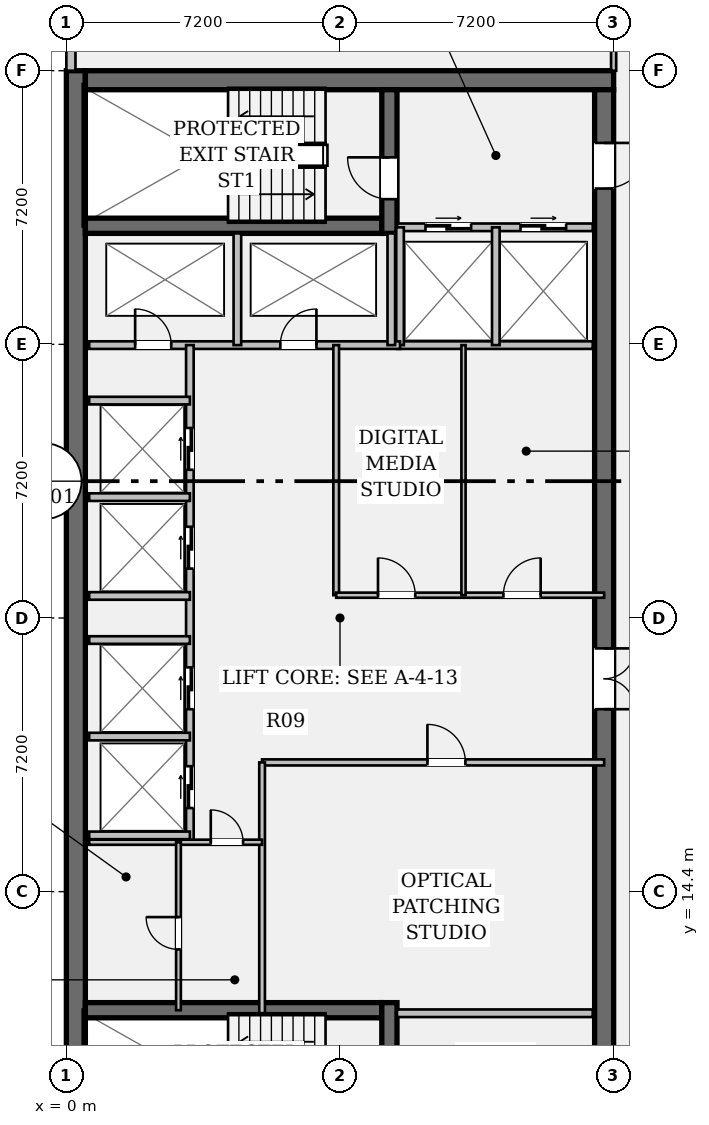
"""IFC4 building model, lengths in metres.
Left out: names, types, materials, properties, quantities, classifications, styles, units other than length and angle.
Written with IfcOpenShell. Run it as: python <this file> out.ifc"""

import sys

from ifc_helpers import new_model, si_unit, direction, frame, frame_2d, origin, place, context, subcontext, project, spatial, rectangle, extrude, element, fill, save


model = new_model("IFC4")
c1 = context("Model", 3, precision=1e-05, world=origin(), true_north=direction((0.0, 1.0)))
c2 = subcontext(c1, "Body", "Model", "MODEL_VIEW")
j1 = project(units=[si_unit("LENGTHUNIT", "METRE"), si_unit("PLANEANGLEUNIT", "RADIAN")], contexts=[c1])
p1 = place(None, origin())
s1 = spatial("IfcSite", under=j1, at=p1, CompositionType="ELEMENT")
p2 = place(p1, origin())
s2 = spatial("IfcBuilding", under=s1, at=p2, CompositionType="ELEMENT")
p3 = place(p2, frame((0.0, 0.0, 276.15)))
s3 = spatial("IfcBuildingStorey", under=s2, at=p3, CompositionType="ELEMENT", Elevation=276.15)
p4 = place(p3, frame((0.25, 7.2, 0.0), z_axis=(0.0, 0.0, 1.0), x_axis=(0.0, 1.0, 0.0)))
e1 = element("IfcWall", 1, at=p4, inside=s3, PredefinedType="SHEAR", context=c2, shape_type="SweptSolid", body=[
    extrude(rectangle(XDim=28.8, YDim=0.5, at=frame_2d((14.4, 0.0))), origin(), (0.0, 0.0, 1.0), 3.24),
])
p5 = place(p3, frame((0.5, 35.75, 0.0), z_axis=(0.0, 0.0, 1.0), x_axis=(1.0, 0.0, 0.0)))
e2 = element("IfcWall", 2, at=p5, inside=s3, PredefinedType="SHEAR", context=c2, shape_type="SweptSolid", body=[
    extrude(rectangle(XDim=13.9, YDim=0.5, at=frame_2d((6.95, 0.0))), origin(), (0.0, 0.0, 1.0), 3.24),
])
p6 = place(p3, frame((14.15, 35.5, 0.0), z_axis=(0.0, 0.0, 1.0), x_axis=(0.0, -1.0, 0.0)))
e3 = element("IfcWall", 3, at=p6, inside=s3, PredefinedType="SHEAR", context=c2, shape_type="SweptSolid", body=[
    extrude(rectangle(XDim=27.8, YDim=0.5, at=frame_2d((13.9, 0.0))), origin(), (0.0, 0.0, 1.0), 3.24),
])
p7 = place(p6, frame((1.4, 0.0, 0.0)))
e4 = element("IfcOpeningElement", 4, at=p7, cuts=e3, PredefinedType="OPENING", context=c2, shape_type="SweptSolid", body=[
    extrude(rectangle(XDim=1.2, YDim=2.15, at=frame_2d((0.6, 1.075))), frame((0.0, 0.262, 0.0), z_axis=(0.0, -1.0, 0.0), x_axis=(1.0, 0.0, 0.0)), (0.0, 0.0, 1.0), 0.524),
])
p8 = place(p6, frame((25.35, 0.0, 0.0)))
e5 = element("IfcOpeningElement", 5, at=p8, cuts=e3, PredefinedType="OPENING", context=c2, shape_type="SweptSolid", body=[
    extrude(rectangle(XDim=1.2, YDim=2.15, at=frame_2d((0.6, 1.075))), frame((0.0, 0.262, 0.0), z_axis=(0.0, -1.0, 0.0), x_axis=(1.0, 0.0, 0.0)), (0.0, 0.0, 1.0), 0.524),
])
p9 = place(p6, frame((14.7, 0.0, 0.0)))
e6 = element("IfcOpeningElement", 6, at=p9, cuts=e3, PredefinedType="OPENING", context=c2, shape_type="SweptSolid", body=[
    extrude(rectangle(XDim=1.6, YDim=2.2, at=frame_2d((0.8, 1.1))), frame((0.0, 0.262, 0.0), z_axis=(0.0, -1.0, 0.0), x_axis=(1.0, 0.0, 0.0)), (0.0, 0.0, 1.0), 0.524),
])
for number, where, z_axis, x_axis in (
    (7, (0.5, 31.92, 0.0), (0.0, 0.0, 1.0), (1.0, 0.0, 0.0)),
    (8, (0.5, 11.28, 0.0), (0.0, 0.0, 1.0), (1.0, 0.0, 0.0)),
):
    element("IfcWall", number, at=place(p3, frame(where, z_axis=z_axis, x_axis=x_axis)), inside=s3, PredefinedType="SHEAR", context=c2, shape_type="SweptSolid", body=[
        extrude(rectangle(XDim=7.8, YDim=0.4, at=frame_2d((3.9, 0.0))), origin(), (0.0, 0.0, 1.0), 3.24),
    ])
p10 = place(p3, frame((8.5, 31.72, 0.0), z_axis=(0.0, 0.0, 1.0), x_axis=(0.0, 1.0, 0.0)))
e9 = element("IfcWall", 9, at=p10, inside=s3, PredefinedType="SHEAR", context=c2, shape_type="SweptSolid", body=[
    extrude(rectangle(XDim=3.78, YDim=0.4, at=frame_2d((1.89, 0.0))), origin(), (0.0, 0.0, 1.0), 3.24),
])
p11 = place(p10, frame((0.9, 0.0, 0.0)))
e10 = element("IfcOpeningElement", 10, at=p11, cuts=e9, PredefinedType="OPENING", context=c2, shape_type="SweptSolid", body=[
    extrude(rectangle(XDim=1.1, YDim=2.15, at=frame_2d((0.55, 1.075))), frame((0.0, 0.212, 0.0), z_axis=(0.0, -1.0, 0.0), x_axis=(1.0, 0.0, 0.0)), (0.0, 0.0, 1.0), 0.424),
])
p12 = place(p3, frame((8.5, 7.7, 0.0), z_axis=(0.0, 0.0, 1.0), x_axis=(0.0, 1.0, 0.0)))
e11 = element("IfcWall", 11, at=p12, inside=s3, PredefinedType="SHEAR", context=c2, shape_type="SweptSolid", body=[
    extrude(rectangle(XDim=3.78, YDim=0.4, at=frame_2d((1.89, 0.0))), origin(), (0.0, 0.0, 1.0), 3.24),
])
p13 = place(p12, frame((0.85, 0.0, 0.0)))
e12 = element("IfcOpeningElement", 12, at=p13, cuts=e11, PredefinedType="OPENING", context=c2, shape_type="SweptSolid", body=[
    extrude(rectangle(XDim=1.1, YDim=2.15, at=frame_2d((0.55, 1.075))), frame((0.0, 0.212, 0.0), z_axis=(0.0, -1.0, 0.0), x_axis=(1.0, 0.0, 0.0)), (0.0, 0.0, 1.0), 0.424),
])
p14 = place(p3, frame((0.12, 36.0, 0.0), z_axis=(0.0, 0.0, 1.0), x_axis=(0.0, 1.0, 0.0)))
e13 = element("IfcWall", 13, at=p14, inside=s3, PredefinedType="STANDARD", context=c2, shape_type="SweptSolid", body=[
    extrude(rectangle(XDim=1.25, YDim=0.24, at=frame_2d((0.625, 0.0))), origin(), (0.0, 0.0, 1.0), 3.24),
])
p15 = place(p3, frame((8.7, 31.88, 0.0), z_axis=(0.0, 0.0, 1.0), x_axis=(1.0, 0.0, 0.0)))
e14 = element("IfcWall", 14, at=p15, inside=s3, PredefinedType="PARTITIONING", context=c2, shape_type="SweptSolid", body=[
    extrude(rectangle(XDim=5.15, YDim=0.2, at=frame_2d((2.575, 0.0))), origin(), (0.0, 0.0, 1.0), 3.24),
])
p16 = place(p15, frame((0.75, 0.0, 0.0)))
e15 = element("IfcOpeningElement", 15, at=p16, cuts=e14, PredefinedType="OPENING", context=c2, shape_type="SweptSolid", body=[
    extrude(rectangle(XDim=1.2, YDim=2.2, at=frame_2d((0.6, 1.1))), frame((0.0, 0.112, 0.0), z_axis=(0.0, -1.0, 0.0), x_axis=(1.0, 0.0, 0.0)), (0.0, 0.0, 1.0), 0.224),
])
p17 = place(p15, frame((3.25, 0.0, 0.0)))
e16 = element("IfcOpeningElement", 16, at=p17, cuts=e14, PredefinedType="OPENING", context=c2, shape_type="SweptSolid", body=[
    extrude(rectangle(XDim=1.2, YDim=2.2, at=frame_2d((0.6, 1.1))), frame((0.0, 0.112, 0.0), z_axis=(0.0, -1.0, 0.0), x_axis=(1.0, 0.0, 0.0)), (0.0, 0.0, 1.0), 0.224),
])
for number, where, z_axis, x_axis in (
    (17, (8.7, 11.2, 0.0), (0.0, 0.0, 1.0), (1.0, 0.0, 0.0)),
    (18, (8.7, 28.78, 0.0), (0.0, 0.0, 1.0), (1.0, 0.0, 0.0)),
):
    element("IfcWall", number, at=place(p3, frame(where, z_axis=z_axis, x_axis=x_axis)), inside=s3, PredefinedType="PARTITIONING", context=c2, shape_type="SweptSolid", body=[
        extrude(rectangle(XDim=5.15, YDim=0.2, at=frame_2d((2.575, 0.0))), origin(), (0.0, 0.0, 1.0), 3.24),
    ])
for number, where, z_axis, x_axis in (
    (19, (8.78, 28.78, 0.0), (0.0, 0.0, 1.0), (0.0, 1.0, 0.0)),
    (20, (11.3, 28.78, 0.0), (0.0, 0.0, 1.0), (0.0, 1.0, 0.0)),
):
    element("IfcWall", number, at=place(p3, frame(where, z_axis=z_axis, x_axis=x_axis)), inside=s3, PredefinedType="PARTITIONING", context=c2, shape_type="SweptSolid", body=[
        extrude(rectangle(XDim=3.1, YDim=0.2, at=frame_2d((1.55, 0.0))), origin(), (0.0, 0.0, 1.0), 3.24),
    ])
p18 = place(p3, frame((0.6, 28.78, 0.0), z_axis=(0.0, 0.0, 1.0), x_axis=(1.0, 0.0, 0.0)))
e21 = element("IfcWall", 21, at=p18, inside=s3, PredefinedType="PARTITIONING", context=c2, shape_type="SweptSolid", body=[
    extrude(rectangle(XDim=8.18, YDim=0.2, at=frame_2d((4.09, 0.0))), origin(), (0.0, 0.0, 1.0), 3.24),
])
p19 = place(p18, frame((1.21, 0.0, 0.0)))
e22 = element("IfcOpeningElement", 22, at=p19, cuts=e21, PredefinedType="OPENING", context=c2, shape_type="SweptSolid", body=[
    extrude(rectangle(XDim=0.95, YDim=2.15, at=frame_2d((0.475, 1.075))), frame((0.0, 0.112, 0.0), z_axis=(0.0, -1.0, 0.0), x_axis=(1.0, 0.0, 0.0)), (0.0, 0.0, 1.0), 0.224),
])
p20 = place(p18, frame((5.03, 0.0, 0.0)))
e23 = element("IfcOpeningElement", 23, at=p20, cuts=e21, PredefinedType="OPENING", context=c2, shape_type="SweptSolid", body=[
    extrude(rectangle(XDim=0.95, YDim=2.15, at=frame_2d((0.475, 1.075))), frame((0.0, 0.112, 0.0), z_axis=(0.0, -1.0, 0.0), x_axis=(1.0, 0.0, 0.0)), (0.0, 0.0, 1.0), 0.224),
])
for number, where, z_axis, x_axis in (
    (24, (4.5, 28.78, 0.0), (0.0, 0.0, 1.0), (0.0, 1.0, 0.0)),
    (25, (8.55, 28.78, 0.0), (0.0, 0.0, 1.0), (0.0, 1.0, 0.0)),
):
    element("IfcWall", number, at=place(p3, frame(where, z_axis=z_axis, x_axis=x_axis)), inside=s3, PredefinedType="PARTITIONING", context=c2, shape_type="SweptSolid", body=[
        extrude(rectangle(XDim=2.94, YDim=0.2, at=frame_2d((1.47, 0.0))), origin(), (0.0, 0.0, 1.0), 3.24),
    ])
p21 = place(p3, frame((3.25, 15.7, 0.0), z_axis=(0.0, 0.0, 1.0), x_axis=(0.0, 1.0, 0.0)))
e26 = element("IfcWall", 26, at=p21, inside=s3, PredefinedType="PARTITIONING", context=c2, shape_type="SweptSolid", body=[
    extrude(rectangle(XDim=13.08, YDim=0.2, at=frame_2d((6.54, 0.0))), origin(), (0.0, 0.0, 1.0), 3.24),
])
p22 = place(p21, frame((0.9, 0.0, 0.0)))
e27 = element("IfcOpeningElement", 27, at=p22, cuts=e26, PredefinedType="OPENING", context=c2, shape_type="SweptSolid", body=[
    extrude(rectangle(XDim=1.1, YDim=2.2, at=frame_2d((0.55, 1.1))), frame((0.0, 0.112, 0.0), z_axis=(0.0, -1.0, 0.0), x_axis=(1.0, 0.0, 0.0)), (0.0, 0.0, 1.0), 0.224),
])
p23 = place(p21, frame((3.5, 0.0, 0.0)))
e28 = element("IfcOpeningElement", 28, at=p23, cuts=e26, PredefinedType="OPENING", context=c2, shape_type="SweptSolid", body=[
    extrude(rectangle(XDim=1.1, YDim=2.2, at=frame_2d((0.55, 1.1))), frame((0.0, 0.112, 0.0), z_axis=(0.0, -1.0, 0.0), x_axis=(1.0, 0.0, 0.0)), (0.0, 0.0, 1.0), 0.224),
])
p24 = place(p21, frame((7.2, 0.0, 0.0)))
e29 = element("IfcOpeningElement", 29, at=p24, cuts=e26, PredefinedType="OPENING", context=c2, shape_type="SweptSolid", body=[
    extrude(rectangle(XDim=1.1, YDim=2.2, at=frame_2d((0.55, 1.1))), frame((0.0, 0.112, 0.0), z_axis=(0.0, -1.0, 0.0), x_axis=(1.0, 0.0, 0.0)), (0.0, 0.0, 1.0), 0.224),
])
p25 = place(p21, frame((9.8, 0.0, 0.0)))
e30 = element("IfcOpeningElement", 30, at=p25, cuts=e26, PredefinedType="OPENING", context=c2, shape_type="SweptSolid", body=[
    extrude(rectangle(XDim=1.1, YDim=2.2, at=frame_2d((0.55, 1.1))), frame((0.0, 0.112, 0.0), z_axis=(0.0, -1.0, 0.0), x_axis=(1.0, 0.0, 0.0)), (0.0, 0.0, 1.0), 0.224),
])
for number, where, z_axis, x_axis in (
    (31, (0.6, 15.88, 0.0), (0.0, 0.0, 1.0), (1.0, 0.0, 0.0)),
    (32, (0.6, 18.48, 0.0), (0.0, 0.0, 1.0), (1.0, 0.0, 0.0)),
    (33, (0.6, 22.18, 0.0), (0.0, 0.0, 1.0), (1.0, 0.0, 0.0)),
    (34, (0.6, 24.78, 0.0), (0.0, 0.0, 1.0), (1.0, 0.0, 0.0)),
    (35, (0.6, 21.02, 0.0), (0.0, 0.0, 1.0), (1.0, 0.0, 0.0)),
    (36, (0.6, 27.32, 0.0), (0.0, 0.0, 1.0), (1.0, 0.0, 0.0)),
):
    element("IfcWall", number, at=place(p3, frame(where, z_axis=z_axis, x_axis=x_axis)), inside=s3, PredefinedType="PARTITIONING", context=c2, shape_type="SweptSolid", body=[
        extrude(rectangle(XDim=2.65, YDim=0.2, at=frame_2d((1.325, 0.0))), origin(), (0.0, 0.0, 1.0), 3.24),
    ])
p26 = place(p3, frame((7.1, 22.2, 0.0), z_axis=(0.0, 0.0, 1.0), x_axis=(0.0, 1.0, 0.0)))
e37 = element("IfcWall", 37, at=p26, inside=s3, PredefinedType="PARTITIONING", context=c2, shape_type="SweptSolid", body=[
    extrude(rectangle(XDim=6.58, YDim=0.15, at=frame_2d((3.29, 0.0))), origin(), (0.0, 0.0, 1.0), 3.24),
])
p27 = place(p3, frame((7.1, 22.2, 0.0), z_axis=(0.0, 0.0, 1.0), x_axis=(1.0, 0.0, 0.0)))
e38 = element("IfcWall", 38, at=p27, inside=s3, PredefinedType="PARTITIONING", context=c2, shape_type="SweptSolid", body=[
    extrude(rectangle(XDim=7.05, YDim=0.135, at=frame_2d((3.525, 0.0))), origin(), (0.0, 0.0, 1.0), 3.24),
])
p28 = place(p27, frame((1.1, 0.0, 0.0)))
e39 = element("IfcOpeningElement", 39, at=p28, cuts=e38, PredefinedType="OPENING", context=c2, shape_type="SweptSolid", body=[
    extrude(rectangle(XDim=0.98, YDim=2.15, at=frame_2d((0.49, 1.075))), frame((0.0, 0.08, 0.0), z_axis=(0.0, -1.0, 0.0), x_axis=(1.0, 0.0, 0.0)), (0.0, 0.0, 1.0), 0.159),
])
p29 = place(p27, frame((4.4, 0.0, 0.0)))
e40 = element("IfcOpeningElement", 40, at=p29, cuts=e38, PredefinedType="OPENING", context=c2, shape_type="SweptSolid", body=[
    extrude(rectangle(XDim=0.98, YDim=2.15, at=frame_2d((0.49, 1.075))), frame((0.0, 0.08, 0.0), z_axis=(0.0, -1.0, 0.0), x_axis=(1.0, 0.0, 0.0)), (0.0, 0.0, 1.0), 0.159),
])
p30 = place(p3, frame((10.45, 22.2, 0.0), z_axis=(0.0, 0.0, 1.0), x_axis=(0.0, 1.0, 0.0)))
e41 = element("IfcWall", 41, at=p30, inside=s3, PredefinedType="PARTITIONING", context=c2, shape_type="SweptSolid", body=[
    extrude(rectangle(XDim=6.58, YDim=0.11, at=frame_2d((3.29, 0.0))), origin(), (0.0, 0.0, 1.0), 3.24),
])
p31 = place(p3, frame((5.15, 17.8, 0.0), z_axis=(0.0, 0.0, 1.0), x_axis=(1.0, 0.0, 0.0)))
e42 = element("IfcWall", 42, at=p31, inside=s3, PredefinedType="PARTITIONING", context=c2, shape_type="SweptSolid", body=[
    extrude(rectangle(XDim=9.0, YDim=0.16, at=frame_2d((4.5, 0.0))), origin(), (0.0, 0.0, 1.0), 3.24),
])
p32 = place(p31, frame((4.35, 0.0, 0.0)))
e43 = element("IfcOpeningElement", 43, at=p32, cuts=e42, PredefinedType="OPENING", context=c2, shape_type="SweptSolid", body=[
    extrude(rectangle(XDim=1.0, YDim=2.15, at=frame_2d((0.5, 1.075))), frame((0.0, 0.092, 0.0), z_axis=(0.0, -1.0, 0.0), x_axis=(1.0, 0.0, 0.0)), (0.0, 0.0, 1.0), 0.184),
])
p33 = place(p3, frame((5.15, 11.2, 0.0), z_axis=(0.0, 0.0, 1.0), x_axis=(0.0, 1.0, 0.0)))
e44 = element("IfcWall", 44, at=p33, inside=s3, PredefinedType="PARTITIONING", context=c2, shape_type="SweptSolid", body=[
    extrude(rectangle(XDim=6.6, YDim=0.15, at=frame_2d((3.3, 0.0))), origin(), (0.0, 0.0, 1.0), 3.24),
])
p34 = place(p3, frame((0.6, 15.7, 0.0), z_axis=(0.0, 0.0, 1.0), x_axis=(1.0, 0.0, 0.0)))
e45 = element("IfcWall", 45, at=p34, inside=s3, PredefinedType="PARTITIONING", context=c2, shape_type="SweptSolid", body=[
    extrude(rectangle(XDim=4.55, YDim=0.135, at=frame_2d((2.275, 0.0))), origin(), (0.0, 0.0, 1.0), 3.24),
])
p35 = place(p34, frame((3.2, 0.0, 0.0)))
e46 = element("IfcOpeningElement", 46, at=p35, cuts=e45, PredefinedType="OPENING", context=c2, shape_type="SweptSolid", body=[
    extrude(rectangle(XDim=0.85, YDim=2.15, at=frame_2d((0.425, 1.075))), frame((0.0, 0.08, 0.0), z_axis=(0.0, -1.0, 0.0), x_axis=(1.0, 0.0, 0.0)), (0.0, 0.0, 1.0), 0.159),
])
p36 = place(p3, frame((2.95, 11.28, 0.0), z_axis=(0.0, 0.0, 1.0), x_axis=(0.0, 1.0, 0.0)))
e47 = element("IfcWall", 47, at=p36, inside=s3, PredefinedType="PARTITIONING", context=c2, shape_type="SweptSolid", body=[
    extrude(rectangle(XDim=4.42, YDim=0.125, at=frame_2d((2.21, 0.0))), origin(), (0.0, 0.0, 1.0), 3.24),
])
p37 = place(p36, frame((1.6, 0.0, 0.0)))
e48 = element("IfcOpeningElement", 48, at=p37, cuts=e47, PredefinedType="OPENING", context=c2, shape_type="SweptSolid", body=[
    extrude(rectangle(XDim=0.85, YDim=2.15, at=frame_2d((0.425, 1.075))), frame((0.0, 0.074, 0.0), z_axis=(0.0, -1.0, 0.0), x_axis=(1.0, 0.0, 0.0)), (0.0, 0.0, 1.0), 0.149),
])
p38 = place(p3, frame((14.4, 36.0, 0.0), z_axis=(0.0, 0.0, 1.0), x_axis=(0.0, 1.0, 0.0)))
e49 = element("IfcWall", 49, at=p38, inside=s3, PredefinedType="PARTITIONING", context=c2, shape_type="SweptSolid", body=[
    extrude(rectangle(XDim=3.88, YDim=0.135, at=frame_2d((1.94, 0.0))), origin(), (0.0, 0.0, 1.0), 2.676),
])
p39 = place(p38, frame((0.65, 0.0, 0.0)))
e50 = element("IfcOpeningElement", 50, at=p39, cuts=e49, PredefinedType="OPENING", context=c2, shape_type="SweptSolid", body=[
    extrude(rectangle(XDim=0.9, YDim=2.15, at=frame_2d((0.45, 1.075))), frame((0.0, 0.08, 0.0), z_axis=(0.0, -1.0, 0.0), x_axis=(1.0, 0.0, 0.0)), (0.0, 0.0, 1.0), 0.159),
])
p40 = place(p11, origin())
e51 = element("IfcDoor", 51, at=p40, inside=s3, OperationType="SINGLE_SWING_RIGHT", PredefinedType="DOOR", context=c2, shape_type="SweptSolid", body=[
    extrude(rectangle(XDim=1.1, YDim=2.15, at=frame_2d((0.55, 1.075))), frame((0.0, 0.025, 0.0), z_axis=(0.0, -1.0, 0.0), x_axis=(1.0, 0.0, 0.0)), (0.0, 0.0, 1.0), 0.05),
])
fill(e10, e51)
p41 = place(p7, origin())
e52 = element("IfcDoor", 52, at=p41, inside=s3, OperationType="SINGLE_SWING_LEFT", PredefinedType="DOOR", context=c2, shape_type="SweptSolid", body=[
    extrude(rectangle(XDim=1.2, YDim=2.15, at=frame_2d((0.6, 1.075))), frame((0.0, 0.025, 0.0), z_axis=(0.0, -1.0, 0.0), x_axis=(1.0, 0.0, 0.0)), (0.0, 0.0, 1.0), 0.05),
])
fill(e4, e52)
p42 = place(p16, origin())
e53 = element("IfcDoor", 53, at=p42, inside=s3, OperationType="DOUBLE_DOOR_SLIDING", PredefinedType="DOOR", context=c2, shape_type="SweptSolid", body=[
    extrude(rectangle(XDim=1.2, YDim=2.2, at=frame_2d((0.6, 1.1))), frame((0.0, 0.025, 0.0), z_axis=(0.0, -1.0, 0.0), x_axis=(1.0, 0.0, 0.0)), (0.0, 0.0, 1.0), 0.05),
])
fill(e15, e53)
p43 = place(p17, origin())
e54 = element("IfcDoor", 54, at=p43, inside=s3, OperationType="DOUBLE_DOOR_SLIDING", PredefinedType="DOOR", context=c2, shape_type="SweptSolid", body=[
    extrude(rectangle(XDim=1.2, YDim=2.2, at=frame_2d((0.6, 1.1))), frame((0.0, 0.025, 0.0), z_axis=(0.0, -1.0, 0.0), x_axis=(1.0, 0.0, 0.0)), (0.0, 0.0, 1.0), 0.05),
])
fill(e16, e54)
p44 = place(p19, origin())
e55 = element("IfcDoor", 55, at=p44, inside=s3, OperationType="SINGLE_SWING_LEFT", PredefinedType="DOOR", context=c2, shape_type="SweptSolid", body=[
    extrude(rectangle(XDim=0.95, YDim=2.15, at=frame_2d((0.475, 1.075))), frame((0.0, 0.025, 0.0), z_axis=(0.0, -1.0, 0.0), x_axis=(1.0, 0.0, 0.0)), (0.0, 0.0, 1.0), 0.05),
])
fill(e22, e55)
p45 = place(p20, origin())
e56 = element("IfcDoor", 56, at=p45, inside=s3, OperationType="SINGLE_SWING_RIGHT", PredefinedType="DOOR", context=c2, shape_type="SweptSolid", body=[
    extrude(rectangle(XDim=0.95, YDim=2.15, at=frame_2d((0.475, 1.075))), frame((0.0, 0.025, 0.0), z_axis=(0.0, -1.0, 0.0), x_axis=(1.0, 0.0, 0.0)), (0.0, 0.0, 1.0), 0.05),
])
fill(e23, e56)
p46 = place(p9, origin())
e57 = element("IfcDoor", 57, at=p46, inside=s3, OperationType="DOUBLE_DOOR_SINGLE_SWING", PredefinedType="DOOR", context=c2, shape_type="SweptSolid", body=[
    extrude(rectangle(XDim=1.6, YDim=2.2, at=frame_2d((0.8, 1.1))), frame((0.0, 0.025, 0.0), z_axis=(0.0, -1.0, 0.0), x_axis=(1.0, 0.0, 0.0)), (0.0, 0.0, 1.0), 0.05),
])
fill(e6, e57)
p47 = place(p22, origin())
e58 = element("IfcDoor", 58, at=p47, inside=s3, OperationType="DOUBLE_DOOR_SLIDING", PredefinedType="DOOR", context=c2, shape_type="SweptSolid", body=[
    extrude(rectangle(XDim=1.1, YDim=2.2, at=frame_2d((0.55, 1.1))), frame((0.0, 0.025, 0.0), z_axis=(0.0, -1.0, 0.0), x_axis=(1.0, 0.0, 0.0)), (0.0, 0.0, 1.0), 0.05),
])
fill(e27, e58)
p48 = place(p23, origin())
e59 = element("IfcDoor", 59, at=p48, inside=s3, OperationType="DOUBLE_DOOR_SLIDING", PredefinedType="DOOR", context=c2, shape_type="SweptSolid", body=[
    extrude(rectangle(XDim=1.1, YDim=2.2, at=frame_2d((0.55, 1.1))), frame((0.0, 0.025, 0.0), z_axis=(0.0, -1.0, 0.0), x_axis=(1.0, 0.0, 0.0)), (0.0, 0.0, 1.0), 0.05),
])
fill(e28, e59)
p49 = place(p24, origin())
e60 = element("IfcDoor", 60, at=p49, inside=s3, OperationType="DOUBLE_DOOR_SLIDING", PredefinedType="DOOR", context=c2, shape_type="SweptSolid", body=[
    extrude(rectangle(XDim=1.1, YDim=2.2, at=frame_2d((0.55, 1.1))), frame((0.0, 0.025, 0.0), z_axis=(0.0, -1.0, 0.0), x_axis=(1.0, 0.0, 0.0)), (0.0, 0.0, 1.0), 0.05),
])
fill(e29, e60)
p50 = place(p25, origin())
e61 = element("IfcDoor", 61, at=p50, inside=s3, OperationType="DOUBLE_DOOR_SLIDING", PredefinedType="DOOR", context=c2, shape_type="SweptSolid", body=[
    extrude(rectangle(XDim=1.1, YDim=2.2, at=frame_2d((0.55, 1.1))), frame((0.0, 0.025, 0.0), z_axis=(0.0, -1.0, 0.0), x_axis=(1.0, 0.0, 0.0)), (0.0, 0.0, 1.0), 0.05),
])
fill(e30, e61)
p51 = place(p28, origin())
e62 = element("IfcDoor", 62, at=p51, inside=s3, OperationType="SINGLE_SWING_LEFT", PredefinedType="DOOR", context=c2, shape_type="SweptSolid", body=[
    extrude(rectangle(XDim=0.98, YDim=2.15, at=frame_2d((0.49, 1.075))), frame((0.0, 0.025, 0.0), z_axis=(0.0, -1.0, 0.0), x_axis=(1.0, 0.0, 0.0)), (0.0, 0.0, 1.0), 0.05),
])
fill(e39, e62)
p52 = place(p29, origin())
e63 = element("IfcDoor", 63, at=p52, inside=s3, OperationType="SINGLE_SWING_RIGHT", PredefinedType="DOOR", context=c2, shape_type="SweptSolid", body=[
    extrude(rectangle(XDim=0.98, YDim=2.15, at=frame_2d((0.49, 1.075))), frame((0.0, 0.025, 0.0), z_axis=(0.0, -1.0, 0.0), x_axis=(1.0, 0.0, 0.0)), (0.0, 0.0, 1.0), 0.05),
])
fill(e40, e63)
p53 = place(p32, origin())
e64 = element("IfcDoor", 64, at=p53, inside=s3, OperationType="SINGLE_SWING_LEFT", PredefinedType="DOOR", context=c2, shape_type="SweptSolid", body=[
    extrude(rectangle(XDim=1.0, YDim=2.15, at=frame_2d((0.5, 1.075))), frame((0.0, 0.025, 0.0), z_axis=(0.0, -1.0, 0.0), x_axis=(1.0, 0.0, 0.0)), (0.0, 0.0, 1.0), 0.05),
])
fill(e43, e64)
p54 = place(p35, origin())
e65 = element("IfcDoor", 65, at=p54, inside=s3, OperationType="SINGLE_SWING_LEFT", PredefinedType="DOOR", context=c2, shape_type="SweptSolid", body=[
    extrude(rectangle(XDim=0.85, YDim=2.15, at=frame_2d((0.425, 1.075))), frame((0.0, 0.025, 0.0), z_axis=(0.0, -1.0, 0.0), x_axis=(1.0, 0.0, 0.0)), (0.0, 0.0, 1.0), 0.05),
])
fill(e46, e65)
p55 = place(p37, origin())
e66 = element("IfcDoor", 66, at=p55, inside=s3, OperationType="SINGLE_SWING_RIGHT", PredefinedType="DOOR", context=c2, shape_type="SweptSolid", body=[
    extrude(rectangle(XDim=0.85, YDim=2.15, at=frame_2d((0.425, 1.075))), frame((0.0, 0.025, 0.0), z_axis=(0.0, -1.0, 0.0), x_axis=(1.0, 0.0, 0.0)), (0.0, 0.0, 1.0), 0.05),
])
fill(e48, e66)
save(model, sys.argv[1])
